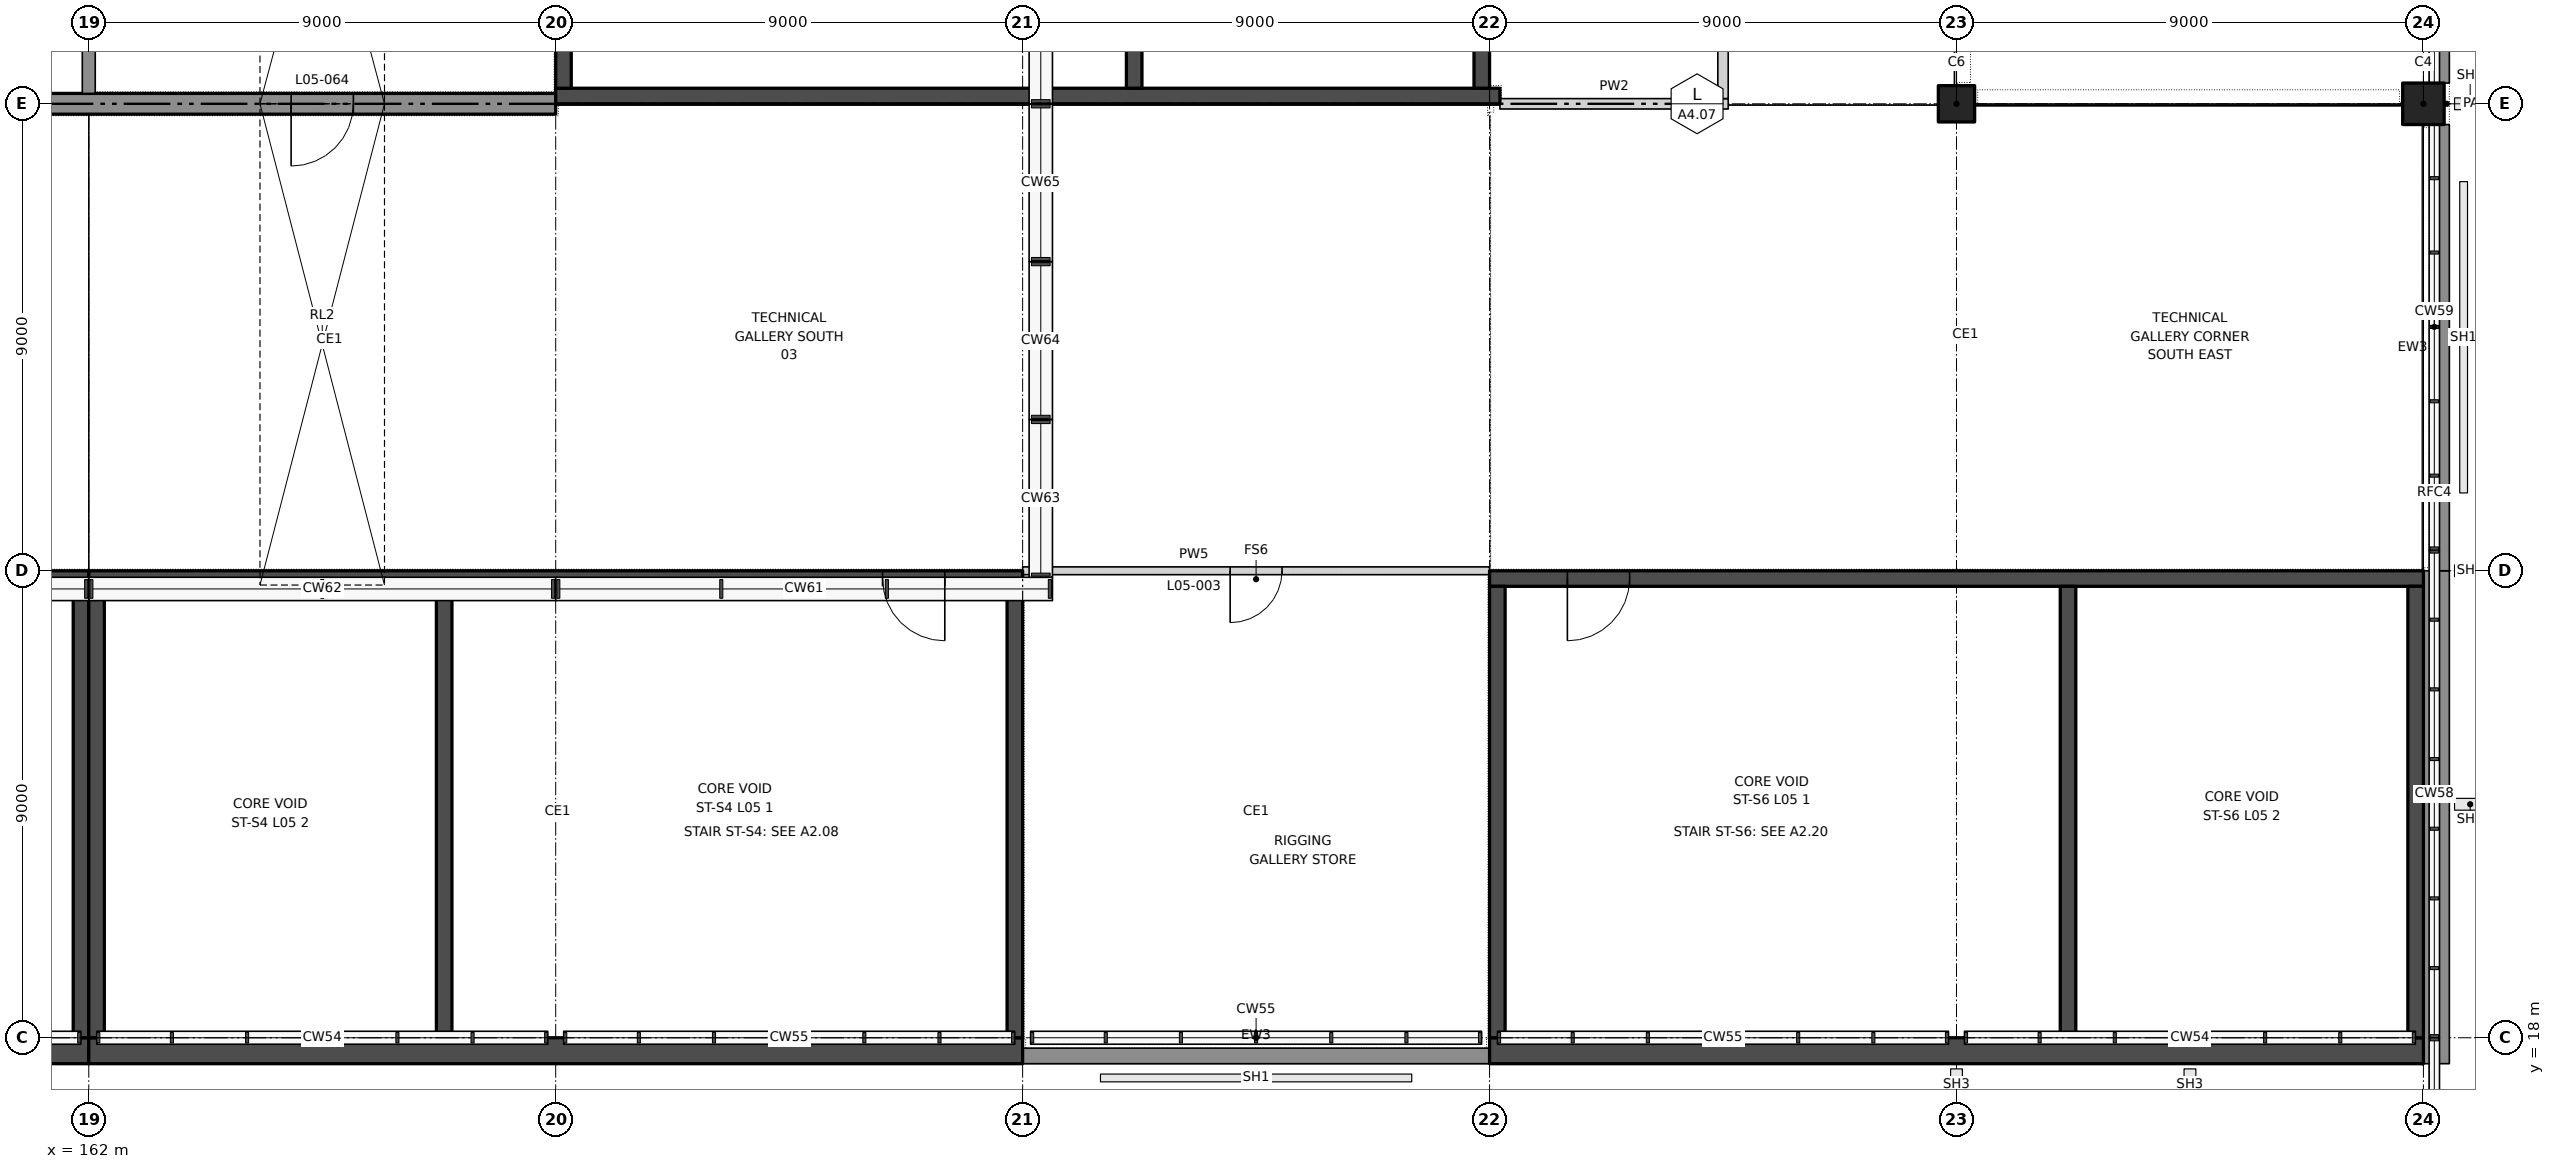
"""IFC4 building model, lengths in metres.
Left out: names, types, materials, properties, quantities, classifications, styles, units other than length and angle.
Written with IfcOpenShell. Run it as: python <this file> out.ifc"""

import sys

from ifc_helpers import new_model, si_unit, direction, frame, frame_2d, origin, origin_2d, place, context, subcontext, project, spatial, polyline, rectangle, outline, extrude, element, fill, save


model = new_model("IFC4")
c1 = context("Model", 3, precision=1e-05, world=origin(), true_north=direction((0.0, 1.0)))
c2 = subcontext(c1, "Body", "Model", "MODEL_VIEW")
j1 = project(units=[si_unit("LENGTHUNIT", "METRE"), si_unit("PLANEANGLEUNIT", "RADIAN")], contexts=[c1])
p1 = place(None, origin())
s1 = spatial("IfcSite", under=j1, at=p1, CompositionType="ELEMENT")
p2 = place(p1, origin())
s2 = spatial("IfcBuilding", under=s1, at=p2, CompositionType="ELEMENT")
p3 = place(p2, frame((0.0, 0.0, 33.5)))
s3 = spatial("IfcBuildingStorey", under=s2, at=p3, CompositionType="ELEMENT", Elevation=33.5)
p4 = place(p3, frame((207.0, 36.0, 0.0), z_axis=(0.0, 0.0, 1.0), x_axis=(1.0, 0.0, 0.0)))
e1 = element("IfcColumn", 1, at=p4, inside=s3, PredefinedType="COLUMN", context=c2, shape_type="SweptSolid", body=[
    extrude(rectangle(XDim=0.8, YDim=0.8, at=origin_2d()), origin(), (0.0, 0.0, 1.0), 4.0),
])
p5 = place(p3, frame((198.0, 36.0, 0.0), z_axis=(0.0, 0.0, 1.0), x_axis=(1.0, 0.0, 0.0)))
e2 = element("IfcColumn", 2, at=p5, inside=s3, PredefinedType="COLUMN", context=c2, shape_type="SweptSolid", body=[
    extrude(rectangle(XDim=0.7, YDim=0.7, at=origin_2d()), origin(), (0.0, 0.0, 1.0), 4.0),
])
p6 = place(p3, frame((90.0, 36.0, 0.0), z_axis=(0.0, 0.0, 1.0), x_axis=(1.0, 0.0, 0.0)))
e3 = element("IfcWall", 3, at=p6, inside=s3, PredefinedType="SOLIDWALL", context=c2, shape_type="SweptSolid", body=[
    extrude(rectangle(XDim=81.0, YDim=0.4, at=frame_2d((40.5, 0.0))), origin(), (0.0, 0.0, 1.0), 4.0),
])
p7 = place(p6, frame((3.9, 0.0, 0.0)))
e4 = element("IfcOpeningElement", 4, at=p7, cuts=e3, PredefinedType="OPENING", context=c2, shape_type="SweptSolid", body=[
    extrude(rectangle(XDim=1.2, YDim=2.1, at=frame_2d((0.6, 1.05))), frame((0.0, 0.21, 0.0), z_axis=(0.0, -1.0, 0.0), x_axis=(1.0, 0.0, 0.0)), (0.0, 0.0, 1.0), 0.42),
])
p8 = place(p6, frame((75.9, 0.0, 0.0)))
e5 = element("IfcOpeningElement", 5, at=p8, cuts=e3, PredefinedType="OPENING", context=c2, shape_type="SweptSolid", body=[
    extrude(rectangle(XDim=1.2, YDim=2.1, at=frame_2d((0.6, 1.05))), frame((0.0, 0.21, 0.0), z_axis=(0.0, -1.0, 0.0), x_axis=(1.0, 0.0, 0.0)), (0.0, 0.0, 1.0), 0.42),
])
p9 = place(p3, frame((180.0, 27.0, 0.0), z_axis=(0.0, 0.0, 1.0), x_axis=(1.0, 0.0, 0.0)))
e6 = element("IfcWall", 6, at=p9, inside=s3, PredefinedType="PARTITIONING", context=c2, shape_type="SweptSolid", body=[
    extrude(rectangle(XDim=9.0, YDim=0.15, at=frame_2d((4.5, 0.0))), origin(), (0.0, 0.0, 1.0), 4.0),
])
p10 = place(p9, frame((4.0, 0.0, 0.0)))
e7 = element("IfcOpeningElement", 7, at=p10, cuts=e6, PredefinedType="OPENING", context=c2, shape_type="SweptSolid", body=[
    extrude(rectangle(XDim=1.0, YDim=2.1, at=frame_2d((0.5, 1.05))), frame((0.0, 0.085, 0.0), z_axis=(0.0, -1.0, 0.0), x_axis=(1.0, 0.0, 0.0)), (0.0, 0.0, 1.0), 0.17),
])
p11 = place(p3, frame((189.2, 36.0, 0.0), z_axis=(0.0, 0.0, 1.0), x_axis=(1.0, 0.0, 0.0)))
e8 = element("IfcWall", 8, at=p11, inside=s3, PredefinedType="PARTITIONING", context=c2, shape_type="SweptSolid", body=[
    extrude(rectangle(XDim=4.4, YDim=0.2, at=frame_2d((2.2, 0.0))), origin(), (0.0, 0.0, 1.0), 4.0),
])
p12 = place(p3, frame((193.5, 36.1, 0.0), z_axis=(0.0, 0.0, 1.0), x_axis=(0.0, 1.0, 0.0)))
e9 = element("IfcWall", 9, at=p12, inside=s3, PredefinedType="PARTITIONING", context=c2, shape_type="SweptSolid", body=[
    extrude(rectangle(XDim=17.8, YDim=0.2, at=frame_2d((8.9, 0.0))), origin(), (0.0, 0.0, 1.0), 4.0),
])
p13 = place(p12, frame((8.0, 0.0, 0.0)))
e10 = element("IfcOpeningElement", 10, at=p13, cuts=e9, PredefinedType="OPENING", context=c2, shape_type="SweptSolid", body=[
    extrude(rectangle(XDim=1.8, YDim=2.1, at=frame_2d((0.9, 1.05))), frame((0.0, 0.11, 0.0), z_axis=(0.0, -1.0, 0.0), x_axis=(1.0, 0.0, 0.0)), (0.0, 0.0, 1.0), 0.22),
])
p14 = place(p3, frame((180.0, 17.65, 0.0), z_axis=(0.0, 0.0, 1.0), x_axis=(1.0, 0.0, 0.0)))
e11 = element("IfcWall", 11, at=p14, inside=s3, PredefinedType="SOLIDWALL", context=c2, shape_type="SweptSolid", body=[
    extrude(rectangle(XDim=9.0, YDim=0.3, at=frame_2d((4.5, 0.0))), origin(), (0.0, 0.0, 1.0), 4.0),
])
p15 = place(p3, frame((207.25, 17.5, 0.0), z_axis=(0.0, 0.0, 1.0), x_axis=(0.0, 1.0, 0.0)))
e12 = element("IfcWall", 12, at=p15, inside=s3, PredefinedType="SOLIDWALL", context=c2, shape_type="SweptSolid", body=[
    extrude(rectangle(XDim=9.5, YDim=0.5, at=frame_2d((4.75, 0.0))), origin(), (0.0, 0.0, 1.0), 4.0),
])
p16 = place(p3, frame((207.35, 27.0, 0.0), z_axis=(0.0, 0.0, 1.0), x_axis=(0.0, 1.0, 0.0)))
e13 = element("IfcWall", 13, at=p16, inside=s3, PredefinedType="SOLIDWALL", context=c2, shape_type="SweptSolid", body=[
    extrude(rectangle(XDim=8.6, YDim=0.3, at=frame_2d((4.3, 0.0))), origin(), (0.0, 0.0, 1.0), 4.0),
])
p17 = place(p3, frame((207.35, 36.4, 0.0), z_axis=(0.0, 0.0, 1.0), x_axis=(0.0, 1.0, 0.0)))
e14 = element("IfcWall", 14, at=p17, inside=s3, PredefinedType="SOLIDWALL", context=c2, shape_type="SweptSolid", body=[
    extrude(rectangle(XDim=8.2, YDim=0.3, at=frame_2d((4.1, 0.0))), origin(), (0.0, 0.0, 1.0), 4.0),
])
p18 = place(p3, frame((144.0, 26.85, 0.0), z_axis=(0.0, 0.0, 1.0), x_axis=(1.0, 0.0, 0.0)))
e15 = element("IfcWall", 15, at=p18, inside=s3, PredefinedType="SHEAR", context=c2, shape_type="SweptSolid", body=[
    extrude(rectangle(XDim=18.0, YDim=0.3, at=frame_2d((9.0, 0.0))), origin(), (0.0, 0.0, 1.0), 4.0),
])
p19 = place(p18, frame((8.6, 0.0, 0.0)))
e16 = element("IfcOpeningElement", 16, at=p19, cuts=e15, PredefinedType="OPENING", context=c2, shape_type="SweptSolid", body=[
    extrude(rectangle(XDim=1.2, YDim=2.1, at=frame_2d((0.6, 1.05))), frame((0.0, 0.16, 0.0), z_axis=(0.0, -1.0, 0.0), x_axis=(1.0, 0.0, 0.0)), (0.0, 0.0, 1.0), 0.32),
])
p20 = place(p3, frame((144.0, 17.75, 0.0), z_axis=(0.0, 0.0, 1.0), x_axis=(1.0, 0.0, 0.0)))
e17 = element("IfcWall", 17, at=p20, inside=s3, PredefinedType="SHEAR", context=c2, shape_type="SweptSolid", body=[
    extrude(rectangle(XDim=18.0, YDim=0.5, at=frame_2d((9.0, 0.0))), origin(), (0.0, 0.0, 1.0), 4.0),
])
p21 = place(p3, frame((161.85, 26.7, 0.0), z_axis=(0.0, 0.0, 1.0), x_axis=(0.0, -1.0, 0.0)))
e18 = element("IfcWall", 18, at=p21, inside=s3, PredefinedType="SHEAR", context=c2, shape_type="SweptSolid", body=[
    extrude(rectangle(XDim=8.7, YDim=0.3, at=frame_2d((4.35, 0.0))), origin(), (0.0, 0.0, 1.0), 4.0),
])
p22 = place(p3, frame((180.0, 26.85, 0.0), z_axis=(0.0, 0.0, 1.0), x_axis=(-1.0, 0.0, 0.0)))
e19 = element("IfcWall", 19, at=p22, inside=s3, PredefinedType="SHEAR", context=c2, shape_type="SweptSolid", body=[
    extrude(rectangle(XDim=18.0, YDim=0.3, at=frame_2d((9.0, 0.0))), origin(), (0.0, 0.0, 1.0), 4.0),
])
p23 = place(p22, frame((1.5, 0.0, 0.0)))
e20 = element("IfcOpeningElement", 20, at=p23, cuts=e19, PredefinedType="OPENING", context=c2, shape_type="SweptSolid", body=[
    extrude(rectangle(XDim=1.2, YDim=2.1, at=frame_2d((0.6, 1.05))), frame((0.0, 0.16, 0.0), z_axis=(0.0, -1.0, 0.0), x_axis=(1.0, 0.0, 0.0)), (0.0, 0.0, 1.0), 0.32),
])
p24 = place(p3, frame((180.0, 17.75, 0.0), z_axis=(0.0, 0.0, 1.0), x_axis=(-1.0, 0.0, 0.0)))
e21 = element("IfcWall", 21, at=p24, inside=s3, PredefinedType="SHEAR", context=c2, shape_type="SweptSolid", body=[
    extrude(rectangle(XDim=18.0, YDim=0.5, at=frame_2d((9.0, 0.0))), origin(), (0.0, 0.0, 1.0), 4.0),
])
for number, where, z_axis, x_axis in (
    (22, (179.85, 26.7, 0.0), (0.0, 0.0, 1.0), (0.0, -1.0, 0.0)),
    (23, (162.15, 26.7, 0.0), (0.0, 0.0, 1.0), (0.0, -1.0, 0.0)),
    (24, (168.85, 26.7, 0.0), (0.0, 0.0, 1.0), (0.0, -1.0, 0.0)),
):
    element("IfcWall", number, at=place(p3, frame(where, z_axis=z_axis, x_axis=x_axis)), inside=s3, PredefinedType="SHEAR", context=c2, shape_type="SweptSolid", body=[
        extrude(rectangle(XDim=8.7, YDim=0.3, at=frame_2d((4.35, 0.0))), origin(), (0.0, 0.0, 1.0), 4.0),
    ])
p25 = place(p3, frame((189.0, 26.85, 0.0), z_axis=(0.0, 0.0, 1.0), x_axis=(1.0, 0.0, 0.0)))
e25 = element("IfcWall", 25, at=p25, inside=s3, PredefinedType="SHEAR", context=c2, shape_type="SweptSolid", body=[
    extrude(rectangle(XDim=18.0, YDim=0.3, at=frame_2d((9.0, 0.0))), origin(), (0.0, 0.0, 1.0), 4.0),
])
p26 = place(p25, frame((1.5, 0.0, 0.0)))
e26 = element("IfcOpeningElement", 26, at=p26, cuts=e25, PredefinedType="OPENING", context=c2, shape_type="SweptSolid", body=[
    extrude(rectangle(XDim=1.2, YDim=2.1, at=frame_2d((0.6, 1.05))), frame((0.0, 0.16, 0.0), z_axis=(0.0, -1.0, 0.0), x_axis=(1.0, 0.0, 0.0)), (0.0, 0.0, 1.0), 0.32),
])
p27 = place(p3, frame((189.0, 17.75, 0.0), z_axis=(0.0, 0.0, 1.0), x_axis=(1.0, 0.0, 0.0)))
e27 = element("IfcWall", 27, at=p27, inside=s3, PredefinedType="SHEAR", context=c2, shape_type="SweptSolid", body=[
    extrude(rectangle(XDim=18.0, YDim=0.5, at=frame_2d((9.0, 0.0))), origin(), (0.0, 0.0, 1.0), 4.0),
])
for number, where, z_axis, x_axis in (
    (28, (189.15, 26.7, 0.0), (0.0, 0.0, 1.0), (0.0, -1.0, 0.0)),
    (29, (206.85, 26.7, 0.0), (0.0, 0.0, 1.0), (0.0, -1.0, 0.0)),
    (30, (200.15, 26.7, 0.0), (0.0, 0.0, 1.0), (0.0, -1.0, 0.0)),
):
    element("IfcWall", number, at=place(p3, frame(where, z_axis=z_axis, x_axis=x_axis)), inside=s3, PredefinedType="SHEAR", context=c2, shape_type="SweptSolid", body=[
        extrude(rectangle(XDim=8.7, YDim=0.3, at=frame_2d((4.35, 0.0))), origin(), (0.0, 0.0, 1.0), 4.0),
    ])
p28 = place(p3, frame((171.0, 36.15, 0.0), z_axis=(0.0, 0.0, 1.0), x_axis=(1.0, 0.0, 0.0)))
e31 = element("IfcWall", 31, at=p28, inside=s3, PredefinedType="SHEAR", context=c2, shape_type="SweptSolid", body=[
    extrude(rectangle(XDim=18.2, YDim=0.3, at=frame_2d((9.1, 0.0))), origin(), (0.0, 0.0, 1.0), 4.0),
])
for number, where, z_axis, x_axis in (
    (32, (171.15, 44.7, 0.0), (0.0, 0.0, 1.0), (0.0, -1.0, 0.0)),
    (33, (188.85, 44.7, 0.0), (0.0, 0.0, 1.0), (0.0, -1.0, 0.0)),
    (34, (182.15, 44.7, 0.0), (0.0, 0.0, 1.0), (0.0, -1.0, 0.0)),
):
    element("IfcWall", number, at=place(p3, frame(where, z_axis=z_axis, x_axis=x_axis)), inside=s3, PredefinedType="SHEAR", context=c2, shape_type="SweptSolid", body=[
        extrude(rectangle(XDim=8.4, YDim=0.3, at=frame_2d((4.2, 0.0))), origin(), (0.0, 0.0, 1.0), 4.0),
    ])
p29 = place(p3, frame((162.0, 36.2, 0.0), z_axis=(0.0, 0.0, 1.0), x_axis=(0.0, 1.0, 0.0)))
e35 = element("IfcWall", 35, at=p29, inside=s3, PredefinedType="SOLIDWALL", context=c2, shape_type="SweptSolid", body=[
    extrude(rectangle(XDim=8.45, YDim=0.25, at=frame_2d((4.225, 0.0))), origin(), (0.0, 0.0, 1.0), 4.0),
])
p30 = place(p10, frame((1.0, 0.0, 0.0), z_axis=(0.0, 0.0, 1.0), x_axis=(-1.0, 0.0, 0.0)))
e36 = element("IfcDoor", 36, at=p30, inside=s3, OperationType="SINGLE_SWING_RIGHT", PredefinedType="DOOR", context=c2, shape_type="SweptSolid", body=[
    extrude(rectangle(XDim=1.0, YDim=2.1, at=frame_2d((0.5, 1.05))), frame((0.0, 0.025, 0.0), z_axis=(0.0, -1.0, 0.0), x_axis=(1.0, 0.0, 0.0)), (0.0, 0.0, 1.0), 0.05),
])
fill(e7, e36)
p31 = place(p23, origin())
e37 = element("IfcDoor", 37, at=p31, inside=s3, OperationType="SINGLE_SWING_LEFT", PredefinedType="DOOR", context=c2, shape_type="SweptSolid", body=[
    extrude(rectangle(XDim=1.2, YDim=2.1, at=frame_2d((0.6, 1.05))), frame((0.0, 0.025, 0.0), z_axis=(0.0, -1.0, 0.0), x_axis=(1.0, 0.0, 0.0)), (0.0, 0.0, 1.0), 0.05),
])
fill(e20, e37)
p32 = place(p26, frame((1.2, 0.0, 0.0), z_axis=(0.0, 0.0, 1.0), x_axis=(-1.0, 0.0, 0.0)))
e38 = element("IfcDoor", 38, at=p32, inside=s3, OperationType="SINGLE_SWING_RIGHT", PredefinedType="DOOR", context=c2, shape_type="SweptSolid", body=[
    extrude(rectangle(XDim=1.2, YDim=2.1, at=frame_2d((0.6, 1.05))), frame((0.0, 0.025, 0.0), z_axis=(0.0, -1.0, 0.0), x_axis=(1.0, 0.0, 0.0)), (0.0, 0.0, 1.0), 0.05),
])
fill(e26, e38)
p33 = place(p2, frame((0.0, 0.0, 47.1)))
p34 = place(p33, frame((135.045, 26.425, 9.109), z_axis=(0.0, -0.072032280133, 0.99740230129), x_axis=(1.0, 0.0, 0.0)))
p35 = place(p34, origin())
e39 = element("IfcWindow", 39, at=p35, inside=s3, PartitioningType="SINGLE_PANEL", PredefinedType="SKYLIGHT", context=c2, shape_type="SweptSolid", body=[
    extrude(outline(polyline([(30.255, 0.301), (32.655, 0.301), (32.655, 9.6), (30.255, 9.6), (30.255, 0.301)])), origin(), (0.0, 0.0, -1.0), 0.05),
])
p36 = place(p34, origin())
e40 = element("IfcWindow", 40, at=p36, inside=s3, PartitioningType="SINGLE_PANEL", PredefinedType="SKYLIGHT", context=c2, shape_type="SweptSolid", body=[
    extrude(outline(polyline([(30.255, 9.6), (32.655, 9.6), (32.655, 18.623), (30.255, 18.623), (30.255, 9.6)])), origin(), (0.0, 0.0, -1.0), 0.05),
])
p37 = place(p8, frame((1.2, 0.0, 0.0), z_axis=(0.0, 0.0, 1.0), x_axis=(-1.0, 0.0, 0.0)))
e41 = element("IfcDoor", 41, at=p37, inside=s3, OperationType="SINGLE_SWING_RIGHT", PredefinedType="DOOR", context=c2, shape_type="SweptSolid", body=[
    extrude(rectangle(XDim=1.2, YDim=2.1, at=frame_2d((0.6, 1.05))), frame((0.0, 0.025, 0.0), z_axis=(0.0, -1.0, 0.0), x_axis=(1.0, 0.0, 0.0)), (0.0, 0.0, 1.0), 0.05),
])
fill(e5, e41)
save(model, sys.argv[1])
